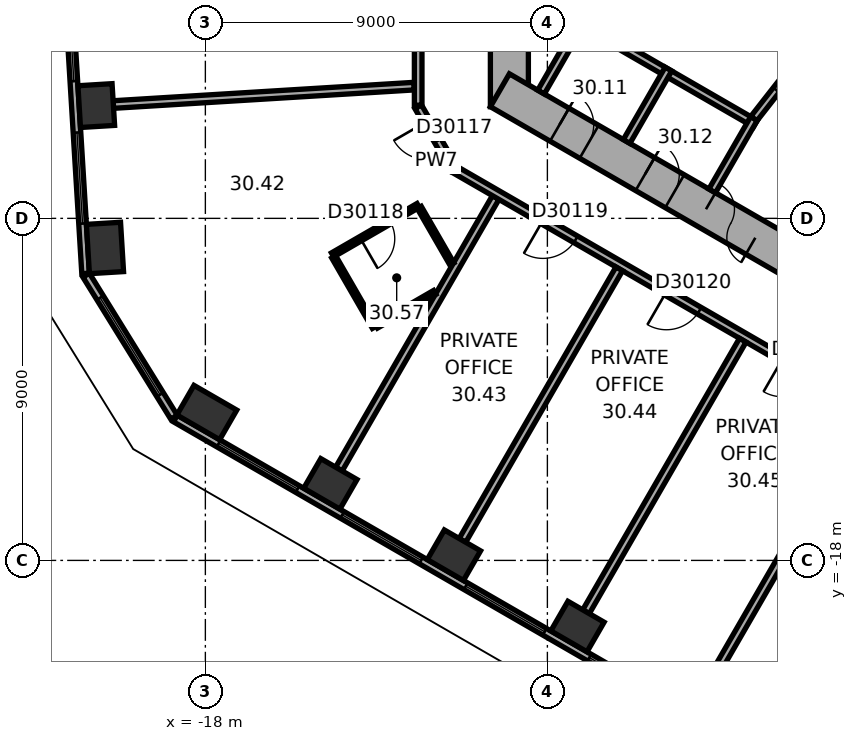
"""IFC4 building model, lengths in metres.
Left out: names, types, materials, properties, quantities, classifications, styles, units other than length and angle.
Written with IfcOpenShell. Run it as: python <this file> out.ifc"""

import sys

from ifc_helpers import new_model, si_unit, direction, frame, frame_2d, origin, origin_2d, place, context, subcontext, project, spatial, rectangle, extrude, element, fill, save


model = new_model("IFC4")
c1 = context("Model", 3, precision=1e-05, world=origin(), true_north=direction((0.0, 1.0)))
c2 = subcontext(c1, "Body", "Model", "MODEL_VIEW")
j1 = project(units=[si_unit("LENGTHUNIT", "METRE"), si_unit("PLANEANGLEUNIT", "RADIAN")], contexts=[c1])
p1 = place(None, origin())
s1 = spatial("IfcSite", under=j1, at=p1, CompositionType="ELEMENT")
p2 = place(p1, origin())
s2 = spatial("IfcBuilding", under=s1, at=p2, CompositionType="ELEMENT")
p3 = place(p2, frame((0.0, 0.0, 124.4)))
s3 = spatial("IfcBuildingStorey", under=s2, at=p3, CompositionType="ELEMENT", Elevation=124.4)
p4 = place(p3, frame((-20.871, -6.032, 0.0), z_axis=(0.0, 0.0, 1.0), x_axis=(0.061048539535, -0.998134798422, 0.0)))
e1 = element("IfcColumn", 1, at=p4, inside=s3, PredefinedType="COLUMN", context=c2, shape_type="SweptSolid", body=[
    extrude(rectangle(XDim=1.1, YDim=0.9, at=origin_2d()), origin(), (0.0, 0.0, 1.0), 3.7),
])
for number, where, z_axis, x_axis in (
    (2, (-20.642, -9.779, 0.0), (0.0, 0.0, 1.0), (0.061, -0.998, 0.0)),
    (3, (-17.962, -14.109, 0.0), (0.0, 0.0, 1.0), (0.866, -0.5, 0.0)),
):
    element("IfcColumn", number, at=place(p3, frame(where, z_axis=z_axis, x_axis=x_axis)), inside=s3, PredefinedType="COLUMN", context=c2, shape_type="SweptSolid", body=[
        extrude(rectangle(XDim=1.3, YDim=0.9, at=origin_2d()), origin(), (0.0, 0.0, 1.0), 3.7),
    ])
for number, where, z_axis, x_axis in (
    (4, (-14.711, -15.986, 0.0), (0.0, 0.0, 1.0), (0.866, -0.5, 0.0)),
    (5, (-11.46, -17.863, 0.0), (0.0, 0.0, 1.0), (0.866, -0.5, 0.0)),
    (6, (-8.208, -19.74, 0.0), (0.0, 0.0, 1.0), (0.866, -0.5, 0.0)),
):
    element("IfcColumn", number, at=place(p3, frame(where, z_axis=z_axis, x_axis=x_axis)), inside=s3, PredefinedType="COLUMN", context=c2, shape_type="SweptSolid", body=[
        extrude(rectangle(XDim=1.1, YDim=0.9, at=origin_2d()), origin(), (0.0, 0.0, 1.0), 3.7),
    ])
p5 = place(p3, frame((-10.0, 6.062, 0.0), z_axis=(0.0, 0.0, 1.0), x_axis=(0.0, -1.0, 0.0)))
e7 = element("IfcWall", 7, at=p5, inside=s3, PredefinedType="SHEAR", context=c2, shape_type="SweptSolid", body=[
    extrude(rectangle(XDim=12.125, YDim=1.0, at=frame_2d((6.062, 0.0))), origin(), (0.0, 0.0, 1.0), 3.7),
])
p6 = place(p5, frame((6.612, 0.0, 0.0)))
e8 = element("IfcOpeningElement", 8, at=p6, cuts=e7, PredefinedType="OPENING", context=c2, shape_type="SweptSolid", body=[
    extrude(rectangle(XDim=0.9, YDim=2.1, at=frame_2d((0.45, 1.05))), frame((0.0, 0.51, 0.0), z_axis=(0.0, -1.0, 0.0), x_axis=(1.0, 0.0, 0.0)), (0.0, 0.0, 1.0), 1.02),
])
p7 = place(p3, frame((-10.25, -5.629, 0.0), z_axis=(0.0, 0.0, 1.0), x_axis=(0.866022616891, -0.50000482701, 0.0)))
e9 = element("IfcWall", 9, at=p7, inside=s3, PredefinedType="SHEAR", context=c2, shape_type="SweptSolid", body=[
    extrude(rectangle(XDim=12.125, YDim=1.0, at=frame_2d((6.062, 0.0))), origin(), (0.0, 0.0, 1.0), 3.7),
])
p8 = place(p7, frame((6.262, 0.0, 0.0)))
e10 = element("IfcOpeningElement", 10, at=p8, cuts=e9, PredefinedType="OPENING", context=c2, shape_type="SweptSolid", body=[
    extrude(rectangle(XDim=1.5, YDim=2.1, at=frame_2d((0.75, 1.05))), frame((0.0, 0.51, 0.0), z_axis=(0.0, -1.0, 0.0), x_axis=(1.0, 0.0, 0.0)), (0.0, 0.0, 1.0), 1.02),
])
p9 = place(p7, frame((1.812, 0.0, 0.0)))
e11 = element("IfcOpeningElement", 11, at=p9, cuts=e9, PredefinedType="OPENING", context=c2, shape_type="SweptSolid", body=[
    extrude(rectangle(XDim=0.9, YDim=2.1, at=frame_2d((0.45, 1.05))), frame((0.0, 0.51, 0.0), z_axis=(0.0, -1.0, 0.0), x_axis=(1.0, 0.0, 0.0)), (0.0, 0.0, 1.0), 1.02),
])
p10 = place(p7, frame((4.412, 0.0, 0.0)))
e12 = element("IfcOpeningElement", 12, at=p10, cuts=e9, PredefinedType="OPENING", context=c2, shape_type="SweptSolid", body=[
    extrude(rectangle(XDim=0.9, YDim=2.1, at=frame_2d((0.45, 1.05))), frame((0.0, 0.51, 0.0), z_axis=(0.0, -1.0, 0.0), x_axis=(1.0, 0.0, 0.0)), (0.0, 0.0, 1.0), 1.02),
])
p11 = place(p3, frame((-22.375, 9.557, 0.0), z_axis=(0.0, 0.0, 1.0), x_axis=(0.061036015339, -0.998135564356, 0.0)))
e13 = element("IfcWall", 13, at=p11, inside=s3, PredefinedType="STANDARD", context=c2, shape_type="SweptSolid", body=[
    extrude(rectangle(XDim=20.044, YDim=0.2, at=frame_2d((10.022, 0.0))), origin(), (0.0, 0.0, 1.0), 3.7),
])
p12 = place(p11, frame((1.313, 0.0, 0.9)))
e14 = element("IfcOpeningElement", 14, at=p12, cuts=e13, PredefinedType="OPENING", context=c2, shape_type="SweptSolid", body=[
    extrude(rectangle(XDim=2.4, YDim=2.0, at=frame_2d((1.2, 1.0))), frame((0.0, 0.11, 0.0), z_axis=(0.0, -1.0, 0.0), x_axis=(1.0, 0.0, 0.0)), (0.0, 0.0, 1.0), 0.22),
])
p13 = place(p11, frame((5.067, 0.0, 0.9)))
e15 = element("IfcOpeningElement", 15, at=p13, cuts=e13, PredefinedType="OPENING", context=c2, shape_type="SweptSolid", body=[
    extrude(rectangle(XDim=2.4, YDim=2.0, at=frame_2d((1.2, 1.0))), frame((0.0, 0.11, 0.0), z_axis=(0.0, -1.0, 0.0), x_axis=(1.0, 0.0, 0.0)), (0.0, 0.0, 1.0), 0.22),
])
p14 = place(p11, frame((8.821, 0.0, 0.9)))
e16 = element("IfcOpeningElement", 16, at=p14, cuts=e13, PredefinedType="OPENING", context=c2, shape_type="SweptSolid", body=[
    extrude(rectangle(XDim=2.4, YDim=2.0, at=frame_2d((1.2, 1.0))), frame((0.0, 0.11, 0.0), z_axis=(0.0, -1.0, 0.0), x_axis=(1.0, 0.0, 0.0)), (0.0, 0.0, 1.0), 0.22),
])
p15 = place(p11, frame((12.575, 0.0, 0.9)))
e17 = element("IfcOpeningElement", 17, at=p15, cuts=e13, PredefinedType="OPENING", context=c2, shape_type="SweptSolid", body=[
    extrude(rectangle(XDim=2.4, YDim=2.0, at=frame_2d((1.2, 1.0))), frame((0.0, 0.11, 0.0), z_axis=(0.0, -1.0, 0.0), x_axis=(1.0, 0.0, 0.0)), (0.0, 0.0, 1.0), 0.22),
])
p16 = place(p11, frame((16.329, 0.0, 0.9)))
e18 = element("IfcOpeningElement", 18, at=p16, cuts=e13, PredefinedType="OPENING", context=c2, shape_type="SweptSolid", body=[
    extrude(rectangle(XDim=2.4, YDim=2.0, at=frame_2d((1.2, 1.0))), frame((0.0, 0.11, 0.0), z_axis=(0.0, -1.0, 0.0), x_axis=(1.0, 0.0, 0.0)), (0.0, 0.0, 1.0), 0.22),
])
p17 = place(p3, frame((-21.137, -10.496, 0.0), z_axis=(0.0, 0.0, 1.0), x_axis=(0.526178661629, -0.850374044786, 0.0)))
e19 = element("IfcWall", 19, at=p17, inside=s3, PredefinedType="STANDARD", context=c2, shape_type="SweptSolid", body=[
    extrude(rectangle(XDim=4.395, YDim=0.2, at=frame_2d((2.197, 0.0))), origin(), (0.0, 0.0, 1.0), 3.7),
])
p18 = place(p17, frame((0.698, 0.0, 0.9)))
e20 = element("IfcOpeningElement", 20, at=p18, cuts=e19, PredefinedType="OPENING", context=c2, shape_type="SweptSolid", body=[
    extrude(rectangle(XDim=3.0, YDim=2.0, at=frame_2d((1.5, 1.0))), frame((0.0, 0.11, 0.0), z_axis=(0.0, -1.0, 0.0), x_axis=(1.0, 0.0, 0.0)), (0.0, 0.0, 1.0), 0.22),
])
p19 = place(p3, frame((-18.789, -14.267, 0.0), z_axis=(0.0, 0.0, 1.0), x_axis=(0.866023315909, -0.500003616288, 0.0)))
e21 = element("IfcWall", 21, at=p19, inside=s3, PredefinedType="STANDARD", context=c2, shape_type="SweptSolid", body=[
    extrude(rectangle(XDim=20.044, YDim=0.2, at=frame_2d((10.022, 0.0))), origin(), (0.0, 0.0, 1.0), 3.7),
])
p20 = place(p19, frame((1.314, 0.0, 0.9)))
e22 = element("IfcOpeningElement", 22, at=p20, cuts=e21, PredefinedType="OPENING", context=c2, shape_type="SweptSolid", body=[
    extrude(rectangle(XDim=2.4, YDim=2.0, at=frame_2d((1.2, 1.0))), frame((0.0, 0.11, 0.0), z_axis=(0.0, -1.0, 0.0), x_axis=(1.0, 0.0, 0.0)), (0.0, 0.0, 1.0), 0.22),
])
p21 = place(p19, frame((5.069, 0.0, 0.9)))
e23 = element("IfcOpeningElement", 23, at=p21, cuts=e21, PredefinedType="OPENING", context=c2, shape_type="SweptSolid", body=[
    extrude(rectangle(XDim=2.4, YDim=2.0, at=frame_2d((1.2, 1.0))), frame((0.0, 0.11, 0.0), z_axis=(0.0, -1.0, 0.0), x_axis=(1.0, 0.0, 0.0)), (0.0, 0.0, 1.0), 0.22),
])
p22 = place(p19, frame((8.823, 0.0, 0.9)))
e24 = element("IfcOpeningElement", 24, at=p22, cuts=e21, PredefinedType="OPENING", context=c2, shape_type="SweptSolid", body=[
    extrude(rectangle(XDim=2.4, YDim=2.0, at=frame_2d((1.2, 1.0))), frame((0.0, 0.11, 0.0), z_axis=(0.0, -1.0, 0.0), x_axis=(1.0, 0.0, 0.0)), (0.0, 0.0, 1.0), 0.22),
])
p23 = place(p19, frame((12.577, 0.0, 0.9)))
e25 = element("IfcOpeningElement", 25, at=p23, cuts=e21, PredefinedType="OPENING", context=c2, shape_type="SweptSolid", body=[
    extrude(rectangle(XDim=2.4, YDim=2.0, at=frame_2d((1.2, 1.0))), frame((0.0, 0.11, 0.0), z_axis=(0.0, -1.0, 0.0), x_axis=(1.0, 0.0, 0.0)), (0.0, 0.0, 1.0), 0.22),
])
p24 = place(p19, frame((16.331, 0.0, 0.9)))
e26 = element("IfcOpeningElement", 26, at=p24, cuts=e21, PredefinedType="OPENING", context=c2, shape_type="SweptSolid", body=[
    extrude(rectangle(XDim=2.4, YDim=2.0, at=frame_2d((1.2, 1.0))), frame((0.0, 0.11, 0.0), z_axis=(0.0, -1.0, 0.0), x_axis=(1.0, 0.0, 0.0)), (0.0, 0.0, 1.0), 0.22),
])
p25 = place(p3, frame((-8.203, -3.809, 0.0), z_axis=(0.0, 0.0, 1.0), x_axis=(0.866028230842, -0.499995103361, 0.0)))
e27 = element("IfcWall", 27, at=p25, inside=s3, PredefinedType="PARTITIONING", context=c2, shape_type="SweptSolid", body=[
    extrude(rectangle(XDim=5.4, YDim=0.2, at=frame_2d((2.7, 0.0))), origin(), (0.0, 0.0, 1.0), 3.42),
])
for number, where, z_axis, x_axis in (
    (28, (-8.067, -3.772, 0.0), (0.0, 0.0, 1.0), (-0.5, -0.866, 0.0)),
    (29, (-5.815, -5.072, 0.0), (0.0, 0.0, 1.0), (-0.5, -0.866, 0.0)),
):
    element("IfcWall", number, at=place(p3, frame(where, z_axis=z_axis, x_axis=x_axis)), inside=s3, PredefinedType="PARTITIONING", context=c2, shape_type="SweptSolid", body=[
        extrude(rectangle(XDim=2.2, YDim=0.2, at=frame_2d((1.1, 0.0))), origin(), (0.0, 0.0, 1.0), 3.42),
    ])
p26 = place(p3, frame((-3.563, -6.372, 0.0), z_axis=(0.0, 0.0, 1.0), x_axis=(-0.499994660107, -0.866028486751, 0.0)))
e30 = element("IfcWall", 30, at=p26, inside=s3, PredefinedType="PARTITIONING", context=c2, shape_type="SweptSolid", body=[
    extrude(rectangle(XDim=2.2, YDim=0.2, at=frame_2d((1.1, 0.0))), origin(), (0.0, 0.0, 1.0), 3.42),
])
p27 = place(p3, frame((-1.712, -4.008, 0.0), z_axis=(0.0, 0.0, 1.0), x_axis=(-0.616549420702, -0.787316208287, 0.0)))
e31 = element("IfcWall", 31, at=p27, inside=s3, PredefinedType="PARTITIONING", context=c2, shape_type="SweptSolid", body=[
    extrude(rectangle(XDim=3.002, YDim=0.2, at=frame_2d((1.501, 0.0))), origin(), (0.0, 0.0, 1.0), 3.42),
])
p28 = place(p27, frame((1.15, 0.0, 0.0)))
e32 = element("IfcOpeningElement", 32, at=p28, cuts=e31, PredefinedType="OPENING", context=c2, shape_type="SweptSolid", body=[
    extrude(rectangle(XDim=0.9, YDim=2.1, at=frame_2d((0.45, 1.05))), frame((0.0, 0.11, 0.0), z_axis=(0.0, -1.0, 0.0), x_axis=(1.0, 0.0, 0.0)), (0.0, 0.0, 1.0), 0.22),
])
p29 = place(p3, frame((-20.421, -6.005, 0.0), z_axis=(0.0, 0.0, 1.0), x_axis=(0.998134865741, 0.061047438866, 0.0)))
e33 = element("IfcWall", 33, at=p29, inside=s3, PredefinedType="PARTITIONING", context=c2, shape_type="SweptSolid", body=[
    extrude(rectangle(XDim=7.927, YDim=0.2, at=frame_2d((3.963, 0.0))), origin(), (0.0, 0.0, 1.0), 2.87),
])
p30 = place(p3, frame((-14.653, -9.961, 0.0), z_axis=(0.0, 0.0, 1.0), x_axis=(0.866021400173, 0.500006934395, 0.0)))
e34 = element("IfcWall", 34, at=p30, inside=s3, PredefinedType="PARTITIONING", context=c2, shape_type="SweptSolid", body=[
    extrude(rectangle(XDim=2.6, YDim=0.12, at=frame_2d((1.3, 0.0))), origin(), (0.0, 0.0, 1.0), 3.42),
])
p31 = place(p30, frame((0.85, 0.0, 0.0)))
e35 = element("IfcOpeningElement", 35, at=p31, cuts=e34, PredefinedType="OPENING", context=c2, shape_type="SweptSolid", body=[
    extrude(rectangle(XDim=0.9, YDim=2.1, at=frame_2d((0.45, 1.05))), frame((0.0, 0.07, 0.0), z_axis=(0.0, -1.0, 0.0), x_axis=(1.0, 0.0, 0.0)), (0.0, 0.0, 1.0), 0.14),
])
p32 = place(p3, frame((-14.486, -15.597, 0.0), z_axis=(0.0, 0.0, 1.0), x_axis=(0.499996545922, 0.866027397988, 0.0)))
e36 = element("IfcWall", 36, at=p32, inside=s3, PredefinedType="PARTITIONING", context=c2, shape_type="SweptSolid", body=[
    extrude(rectangle(XDim=8.25, YDim=0.2, at=frame_2d((4.125, 0.0))), origin(), (0.0, 0.0, 1.0), 3.42),
])
p33 = place(p3, frame((-13.552, -11.866, 0.0), z_axis=(0.0, 0.0, 1.0), x_axis=(-0.500028586798, 0.86600889856, 0.0)))
e37 = element("IfcWall", 37, at=p33, inside=s3, PredefinedType="PARTITIONING", context=c2, shape_type="SweptSolid", body=[
    extrude(rectangle(XDim=2.14, YDim=0.12, at=frame_2d((1.07, 0.0))), origin(), (0.0, 0.0, 1.0), 3.42),
])
p34 = place(p3, frame((-12.4, -6.062, 0.0), z_axis=(0.0, 0.0, 1.0), x_axis=(0.500022797313, -0.86601224135, 0.0)))
e38 = element("IfcWall", 38, at=p34, inside=s3, PredefinedType="PARTITIONING", context=c2, shape_type="SweptSolid", body=[
    extrude(rectangle(XDim=1.9, YDim=0.2, at=frame_2d((0.95, 0.0))), origin(), (0.0, 0.0, 1.0), 3.42),
])
p35 = place(p34, frame((0.45, 0.0, 0.0)))
e39 = element("IfcOpeningElement", 39, at=p35, cuts=e38, PredefinedType="OPENING", context=c2, shape_type="SweptSolid", body=[
    extrude(rectangle(XDim=1.0, YDim=2.1, at=frame_2d((0.5, 1.05))), frame((0.0, 0.11, 0.0), z_axis=(0.0, -1.0, 0.0), x_axis=(1.0, 0.0, 0.0)), (0.0, 0.0, 1.0), 0.22),
])
p36 = place(p3, frame((-12.4, 5.769, 0.0), z_axis=(0.0, 0.0, 1.0), x_axis=(0.0, -1.0, 0.0)))
e40 = element("IfcWall", 40, at=p36, inside=s3, PredefinedType="PARTITIONING", context=c2, shape_type="SweptSolid", body=[
    extrude(rectangle(XDim=11.792, YDim=0.2, at=frame_2d((5.896, 0.0))), origin(), (0.0, 0.0, 1.0), 3.42),
])
p37 = place(p36, frame((6.267, 0.0, 0.0)))
e41 = element("IfcOpeningElement", 41, at=p37, cuts=e40, PredefinedType="OPENING", context=c2, shape_type="SweptSolid", body=[
    extrude(rectangle(XDim=1.0, YDim=2.1, at=frame_2d((0.5, 1.05))), frame((0.0, 0.11, 0.0), z_axis=(0.0, -1.0, 0.0), x_axis=(1.0, 0.0, 0.0)), (0.0, 0.0, 1.0), 0.22),
])
p38 = place(p3, frame((-12.371, -8.713, 0.0), z_axis=(0.0, 0.0, 1.0), x_axis=(0.499910907645, -0.86607683517, 0.0)))
e42 = element("IfcWall", 42, at=p38, inside=s3, PredefinedType="PARTITIONING", context=c2, shape_type="SweptSolid", body=[
    extrude(rectangle(XDim=1.719, YDim=0.12, at=frame_2d((0.86, 0.0))), origin(), (0.0, 0.0, 1.0), 3.42),
])
p39 = place(p3, frame((-11.964, -10.949, 0.0), z_axis=(0.0, 0.0, 1.0), x_axis=(-0.86600680221, -0.500032217487, 0.0)))
e43 = element("IfcWall", 43, at=p39, inside=s3, PredefinedType="PARTITIONING", context=c2, shape_type="SweptSolid", body=[
    extrude(rectangle(XDim=1.774, YDim=0.12, at=frame_2d((0.887, 0.0))), origin(), (0.0, 0.0, 1.0), 3.42),
])
p40 = place(p3, frame((-11.415, -7.728, 0.0), z_axis=(0.0, 0.0, 1.0), x_axis=(0.866022749921, -0.500004596598, 0.0)))
e44 = element("IfcWall", 44, at=p40, inside=s3, PredefinedType="PARTITIONING", context=c2, shape_type="SweptSolid", body=[
    extrude(rectangle(XDim=12.084, YDim=0.2, at=frame_2d((6.042, 0.0))), origin(), (0.0, 0.0, 1.0), 3.42),
])
p41 = place(p40, frame((2.652, 0.0, 0.0)))
e45 = element("IfcOpeningElement", 45, at=p41, cuts=e44, PredefinedType="OPENING", context=c2, shape_type="SweptSolid", body=[
    extrude(rectangle(XDim=1.0, YDim=2.1, at=frame_2d((0.5, 1.05))), frame((0.0, 0.11, 0.0), z_axis=(0.0, -1.0, 0.0), x_axis=(1.0, 0.0, 0.0)), (0.0, 0.0, 1.0), 0.22),
])
p42 = place(p40, frame((6.406, 0.0, 0.0)))
e46 = element("IfcOpeningElement", 46, at=p42, cuts=e44, PredefinedType="OPENING", context=c2, shape_type="SweptSolid", body=[
    extrude(rectangle(XDim=1.0, YDim=2.1, at=frame_2d((0.5, 1.05))), frame((0.0, 0.11, 0.0), z_axis=(0.0, -1.0, 0.0), x_axis=(1.0, 0.0, 0.0)), (0.0, 0.0, 1.0), 0.22),
])
p43 = place(p40, frame((9.934, 0.0, 0.0)))
e47 = element("IfcOpeningElement", 47, at=p43, cuts=e44, PredefinedType="OPENING", context=c2, shape_type="SweptSolid", body=[
    extrude(rectangle(XDim=1.0, YDim=2.1, at=frame_2d((0.5, 1.05))), frame((0.0, 0.11, 0.0), z_axis=(0.0, -1.0, 0.0), x_axis=(1.0, 0.0, 0.0)), (0.0, 0.0, 1.0), 0.22),
])
p44 = place(p3, frame((-11.235, -17.474, 0.0), z_axis=(0.0, 0.0, 1.0), x_axis=(0.499996545922, 0.866027397988, 0.0)))
e48 = element("IfcWall", 48, at=p44, inside=s3, PredefinedType="PARTITIONING", context=c2, shape_type="SweptSolid", body=[
    extrude(rectangle(XDim=8.25, YDim=0.2, at=frame_2d((4.125, 0.0))), origin(), (0.0, 0.0, 1.0), 2.87),
])
p45 = place(p3, frame((-7.984, -19.351, 0.0), z_axis=(0.0, 0.0, 1.0), x_axis=(0.500009360108, 0.866019999656, 0.0)))
e49 = element("IfcWall", 49, at=p45, inside=s3, PredefinedType="PARTITIONING", context=c2, shape_type="SweptSolid", body=[
    extrude(rectangle(XDim=8.25, YDim=0.2, at=frame_2d((4.125, 0.0))), origin(), (0.0, 0.0, 1.0), 3.42),
])
p46 = place(p3, frame((-4.732, -21.228, 0.0), z_axis=(0.0, 0.0, 1.0), x_axis=(0.500000843414, 0.866024916838, 0.0)))
e50 = element("IfcWall", 50, at=p46, inside=s3, PredefinedType="PARTITIONING", context=c2, shape_type="SweptSolid", body=[
    extrude(rectangle(XDim=8.452, YDim=0.2, at=frame_2d((4.226, 0.0))), origin(), (0.0, 0.0, 1.0), 3.42),
])
p47 = place(p15, origin())
e51 = element("IfcWindow", 51, at=p47, inside=s3, PartitioningType="SINGLE_PANEL", PredefinedType="WINDOW", context=c2, shape_type="SweptSolid", body=[
    extrude(rectangle(XDim=2.4, YDim=2.0, at=frame_2d((1.2, 1.0))), frame((0.0, 0.03, 0.0), z_axis=(0.0, -1.0, 0.0), x_axis=(1.0, 0.0, 0.0)), (0.0, 0.0, 1.0), 0.06),
])
fill(e17, e51)
p48 = place(p16, origin())
e52 = element("IfcWindow", 52, at=p48, inside=s3, PartitioningType="SINGLE_PANEL", PredefinedType="WINDOW", context=c2, shape_type="SweptSolid", body=[
    extrude(rectangle(XDim=2.4, YDim=2.0, at=frame_2d((1.2, 1.0))), frame((0.0, 0.03, 0.0), z_axis=(0.0, -1.0, 0.0), x_axis=(1.0, 0.0, 0.0)), (0.0, 0.0, 1.0), 0.06),
])
fill(e18, e52)
p49 = place(p18, origin())
e53 = element("IfcWindow", 53, at=p49, inside=s3, PartitioningType="SINGLE_PANEL", PredefinedType="WINDOW", context=c2, shape_type="SweptSolid", body=[
    extrude(rectangle(XDim=3.0, YDim=2.0, at=frame_2d((1.5, 1.0))), frame((0.0, 0.03, 0.0), z_axis=(0.0, -1.0, 0.0), x_axis=(1.0, 0.0, 0.0)), (0.0, 0.0, 1.0), 0.06),
])
fill(e20, e53)
p50 = place(p20, origin())
e54 = element("IfcWindow", 54, at=p50, inside=s3, PartitioningType="SINGLE_PANEL", PredefinedType="WINDOW", context=c2, shape_type="SweptSolid", body=[
    extrude(rectangle(XDim=2.4, YDim=2.0, at=frame_2d((1.2, 1.0))), frame((0.0, 0.03, 0.0), z_axis=(0.0, -1.0, 0.0), x_axis=(1.0, 0.0, 0.0)), (0.0, 0.0, 1.0), 0.06),
])
fill(e22, e54)
p51 = place(p21, origin())
e55 = element("IfcWindow", 55, at=p51, inside=s3, PartitioningType="SINGLE_PANEL", PredefinedType="WINDOW", context=c2, shape_type="SweptSolid", body=[
    extrude(rectangle(XDim=2.4, YDim=2.0, at=frame_2d((1.2, 1.0))), frame((0.0, 0.03, 0.0), z_axis=(0.0, -1.0, 0.0), x_axis=(1.0, 0.0, 0.0)), (0.0, 0.0, 1.0), 0.06),
])
fill(e23, e55)
p52 = place(p22, origin())
e56 = element("IfcWindow", 56, at=p52, inside=s3, PartitioningType="SINGLE_PANEL", PredefinedType="WINDOW", context=c2, shape_type="SweptSolid", body=[
    extrude(rectangle(XDim=2.4, YDim=2.0, at=frame_2d((1.2, 1.0))), frame((0.0, 0.03, 0.0), z_axis=(0.0, -1.0, 0.0), x_axis=(1.0, 0.0, 0.0)), (0.0, 0.0, 1.0), 0.06),
])
fill(e24, e56)
p53 = place(p23, origin())
e57 = element("IfcWindow", 57, at=p53, inside=s3, PartitioningType="SINGLE_PANEL", PredefinedType="WINDOW", context=c2, shape_type="SweptSolid", body=[
    extrude(rectangle(XDim=2.4, YDim=2.0, at=frame_2d((1.2, 1.0))), frame((0.0, 0.03, 0.0), z_axis=(0.0, -1.0, 0.0), x_axis=(1.0, 0.0, 0.0)), (0.0, 0.0, 1.0), 0.06),
])
fill(e25, e57)
p54 = place(p8, origin())
e58 = element("IfcDoor", 58, at=p54, inside=s3, OperationType="DOUBLE_DOOR_SINGLE_SWING", PredefinedType="DOOR", context=c2, shape_type="SweptSolid", body=[
    extrude(rectangle(XDim=1.5, YDim=2.1, at=frame_2d((0.75, 1.05))), frame((0.0, 0.025, 0.0), z_axis=(0.0, -1.0, 0.0), x_axis=(1.0, 0.0, 0.0)), (0.0, 0.0, 1.0), 0.05),
])
fill(e10, e58)
p55 = place(p28, origin())
e59 = element("IfcDoor", 59, at=p55, inside=s3, OperationType="SINGLE_SWING_LEFT", PredefinedType="DOOR", context=c2, shape_type="SweptSolid", body=[
    extrude(rectangle(XDim=0.9, YDim=2.1, at=frame_2d((0.45, 1.05))), frame((0.0, 0.025, 0.0), z_axis=(0.0, -1.0, 0.0), x_axis=(1.0, 0.0, 0.0)), (0.0, 0.0, 1.0), 0.05),
])
fill(e32, e59)
p56 = place(p9, origin())
e60 = element("IfcDoor", 60, at=p56, inside=s3, OperationType="SINGLE_SWING_LEFT", PredefinedType="DOOR", context=c2, shape_type="SweptSolid", body=[
    extrude(rectangle(XDim=0.9, YDim=2.1, at=frame_2d((0.45, 1.05))), frame((0.0, 0.025, 0.0), z_axis=(0.0, -1.0, 0.0), x_axis=(1.0, 0.0, 0.0)), (0.0, 0.0, 1.0), 0.05),
])
fill(e11, e60)
p57 = place(p10, origin())
e61 = element("IfcDoor", 61, at=p57, inside=s3, OperationType="SINGLE_SWING_LEFT", PredefinedType="DOOR", context=c2, shape_type="SweptSolid", body=[
    extrude(rectangle(XDim=0.9, YDim=2.1, at=frame_2d((0.45, 1.05))), frame((0.0, 0.025, 0.0), z_axis=(0.0, -1.0, 0.0), x_axis=(1.0, 0.0, 0.0)), (0.0, 0.0, 1.0), 0.05),
])
fill(e12, e61)
p58 = place(p35, origin())
e62 = element("IfcDoor", 62, at=p58, inside=s3, OperationType="SINGLE_SWING_LEFT", PredefinedType="DOOR", context=c2, shape_type="SweptSolid", body=[
    extrude(rectangle(XDim=1.0, YDim=2.1, at=frame_2d((0.5, 1.05))), frame((0.0, 0.025, 0.0), z_axis=(0.0, -1.0, 0.0), x_axis=(1.0, 0.0, 0.0)), (0.0, 0.0, 1.0), 0.05),
])
fill(e39, e62)
p59 = place(p31, origin())
e63 = element("IfcDoor", 63, at=p59, inside=s3, OperationType="SINGLE_SWING_LEFT", PredefinedType="DOOR", context=c2, shape_type="SweptSolid", body=[
    extrude(rectangle(XDim=0.9, YDim=2.1, at=frame_2d((0.45, 1.05))), frame((0.0, 0.025, 0.0), z_axis=(0.0, -1.0, 0.0), x_axis=(1.0, 0.0, 0.0)), (0.0, 0.0, 1.0), 0.05),
])
fill(e35, e63)
p60 = place(p41, origin())
e64 = element("IfcDoor", 64, at=p60, inside=s3, OperationType="SINGLE_SWING_LEFT", PredefinedType="DOOR", context=c2, shape_type="SweptSolid", body=[
    extrude(rectangle(XDim=1.0, YDim=2.1, at=frame_2d((0.5, 1.05))), frame((0.0, 0.025, 0.0), z_axis=(0.0, -1.0, 0.0), x_axis=(1.0, 0.0, 0.0)), (0.0, 0.0, 1.0), 0.05),
])
fill(e45, e64)
p61 = place(p42, origin())
e65 = element("IfcDoor", 65, at=p61, inside=s3, OperationType="SINGLE_SWING_LEFT", PredefinedType="DOOR", context=c2, shape_type="SweptSolid", body=[
    extrude(rectangle(XDim=1.0, YDim=2.1, at=frame_2d((0.5, 1.05))), frame((0.0, 0.025, 0.0), z_axis=(0.0, -1.0, 0.0), x_axis=(1.0, 0.0, 0.0)), (0.0, 0.0, 1.0), 0.05),
])
fill(e46, e65)
save(model, sys.argv[1])
